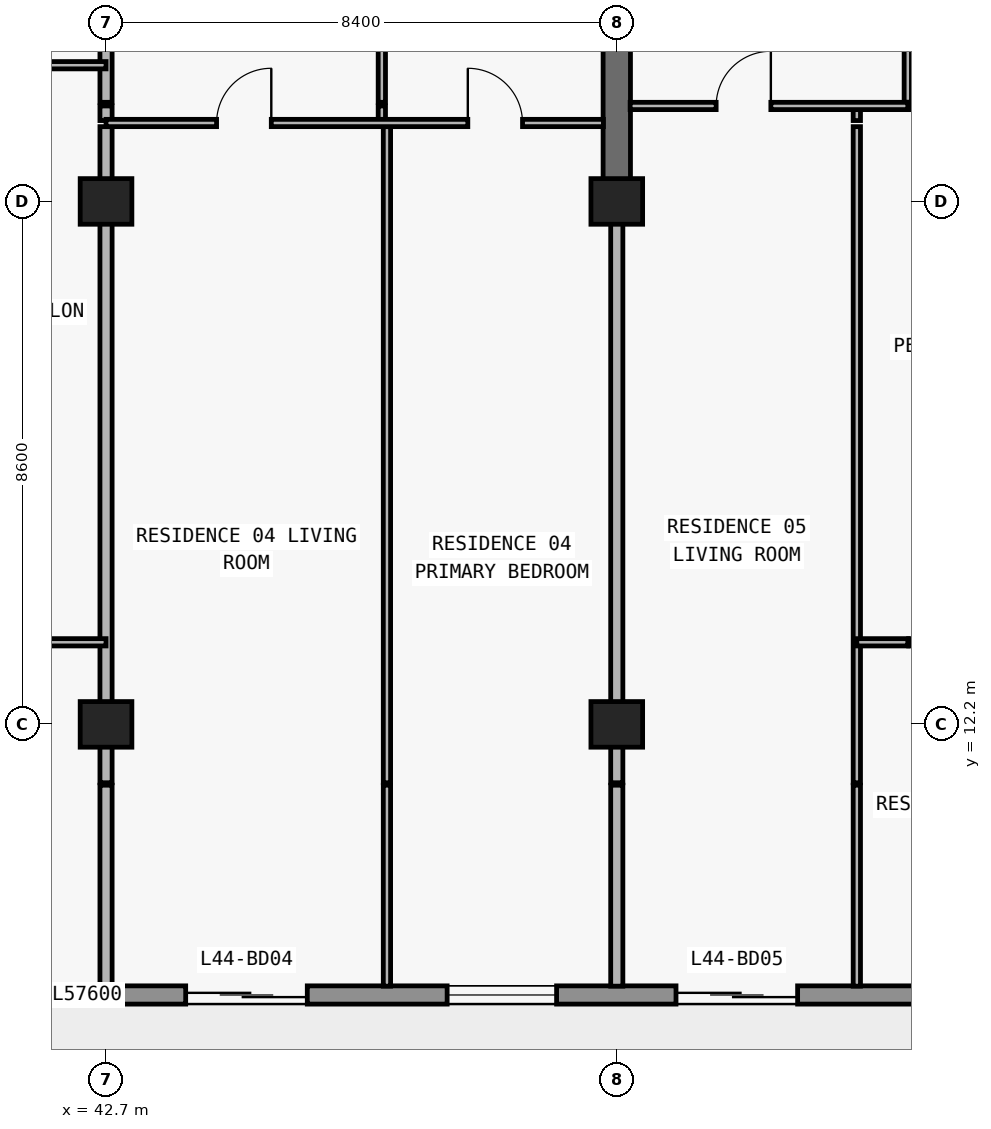
"""IFC4 building model, lengths in metres.
Left out: names, types, materials, properties, quantities, classifications, styles, units other than length and angle.
Written with IfcOpenShell. Run it as: python <this file> out.ifc"""

import sys

from ifc_helpers import new_model, si_unit, direction, frame, frame_2d, origin, origin_2d, place, context, subcontext, project, spatial, rectangle, extrude, element, fill, save


model = new_model("IFC4")
c1 = context("Model", 3, precision=1e-05, world=origin(), true_north=direction((0.0, 1.0)))
c2 = subcontext(c1, "Body", "Model", "MODEL_VIEW")
j1 = project(units=[si_unit("LENGTHUNIT", "METRE"), si_unit("PLANEANGLEUNIT", "RADIAN")], contexts=[c1])
p1 = place(None, origin())
s1 = spatial("IfcSite", under=j1, at=p1, CompositionType="ELEMENT")
p2 = place(p1, origin())
s2 = spatial("IfcBuilding", under=s1, at=p2, CompositionType="ELEMENT")
p3 = place(p2, frame((0.0, 0.0, 160.5)))
s3 = spatial("IfcBuildingStorey", under=s2, at=p3, CompositionType="ELEMENT", Elevation=160.5)
for number, where, z_axis, x_axis in (
    (1, (42.7, 12.2, 0.0), (0.0, 0.0, 1.0), (1.0, 0.0, 0.0)),
    (2, (51.1, 12.2, 0.0), (0.0, 0.0, 1.0), (1.0, 0.0, 0.0)),
    (3, (42.7, 20.8, 0.0), (0.0, 0.0, 1.0), (1.0, 0.0, 0.0)),
    (4, (51.1, 20.8, 0.0), (0.0, 0.0, 1.0), (1.0, 0.0, 0.0)),
):
    element("IfcColumn", number, at=place(p3, frame(where, z_axis=z_axis, x_axis=x_axis)), inside=s3, PredefinedType="COLUMN", context=c2, shape_type="SweptSolid", body=[
        extrude(rectangle(XDim=0.85, YDim=0.75, at=origin_2d()), origin(), (0.0, 0.0, 1.0), 3.05),
    ])
p4 = place(p3, frame((51.1, 20.8, 0.0), z_axis=(0.0, 0.0, 1.0), x_axis=(0.0, 1.0, 0.0)))
e5 = element("IfcWall", 5, at=p4, inside=s3, PredefinedType="SHEAR", context=c2, shape_type="SweptSolid", body=[
    extrude(rectangle(XDim=8.6, YDim=0.45, at=frame_2d((4.3, 0.0))), origin(), (0.0, 0.0, 1.0), 3.05),
])
p5 = place(p3, frame((67.7, 7.75, 0.0), z_axis=(0.0, 0.0, 1.0), x_axis=(-1.0, 0.0, 0.0)))
e6 = element("IfcWall", 6, at=p5, inside=s3, PredefinedType="STANDARD", context=c2, shape_type="SweptSolid", body=[
    extrude(rectangle(XDim=57.6, YDim=0.3, at=frame_2d((28.8, 0.0))), origin(), (0.0, 0.0, 1.0), 3.05),
])
p6 = place(p5, frame((54.673, 0.0, 0.0)))
e7 = element("IfcOpeningElement", 7, at=p6, cuts=e6, PredefinedType="OPENING", context=c2, shape_type="SweptSolid", body=[
    extrude(rectangle(XDim=2.0, YDim=2.3, at=frame_2d((1.0, 1.15))), frame((0.0, 0.16, 0.0), z_axis=(0.0, -1.0, 0.0), x_axis=(1.0, 0.0, 0.0)), (0.0, 0.0, 1.0), 0.32),
])
p7 = place(p5, frame((50.473, 0.0, 0.85)))
e8 = element("IfcOpeningElement", 8, at=p7, cuts=e6, PredefinedType="OPENING", context=c2, shape_type="SweptSolid", body=[
    extrude(rectangle(XDim=2.2, YDim=1.55, at=frame_2d((1.1, 0.775))), frame((0.0, 0.16, 0.0), z_axis=(0.0, -1.0, 0.0), x_axis=(1.0, 0.0, 0.0)), (0.0, 0.0, 1.0), 0.32),
])
p8 = place(p5, frame((46.09, 0.0, 0.0)))
e9 = element("IfcOpeningElement", 9, at=p8, cuts=e6, PredefinedType="OPENING", context=c2, shape_type="SweptSolid", body=[
    extrude(rectangle(XDim=2.0, YDim=2.3, at=frame_2d((1.0, 1.15))), frame((0.0, 0.16, 0.0), z_axis=(0.0, -1.0, 0.0), x_axis=(1.0, 0.0, 0.0)), (0.0, 0.0, 1.0), 0.32),
])
p9 = place(p5, frame((41.99, 0.0, 0.85)))
e10 = element("IfcOpeningElement", 10, at=p9, cuts=e6, PredefinedType="OPENING", context=c2, shape_type="SweptSolid", body=[
    extrude(rectangle(XDim=1.8, YDim=1.55, at=frame_2d((0.9, 0.775))), frame((0.0, 0.16, 0.0), z_axis=(0.0, -1.0, 0.0), x_axis=(1.0, 0.0, 0.0)), (0.0, 0.0, 1.0), 0.32),
])
p10 = place(p5, frame((38.09, 0.0, 0.0)))
e11 = element("IfcOpeningElement", 11, at=p10, cuts=e6, PredefinedType="OPENING", context=c2, shape_type="SweptSolid", body=[
    extrude(rectangle(XDim=2.0, YDim=2.3, at=frame_2d((1.0, 1.15))), frame((0.0, 0.16, 0.0), z_axis=(0.0, -1.0, 0.0), x_axis=(1.0, 0.0, 0.0)), (0.0, 0.0, 1.0), 0.32),
])
p11 = place(p5, frame((33.41, 0.0, 0.65)))
e12 = element("IfcOpeningElement", 12, at=p11, cuts=e6, PredefinedType="OPENING", context=c2, shape_type="SweptSolid", body=[
    extrude(rectangle(XDim=2.6, YDim=1.85, at=frame_2d((1.3, 0.925))), frame((0.0, 0.16, 0.0), z_axis=(0.0, -1.0, 0.0), x_axis=(1.0, 0.0, 0.0)), (0.0, 0.0, 1.0), 0.32),
])
p12 = place(p5, frame((27.7, 0.0, 0.85)))
e13 = element("IfcOpeningElement", 13, at=p12, cuts=e6, PredefinedType="OPENING", context=c2, shape_type="SweptSolid", body=[
    extrude(rectangle(XDim=2.2, YDim=1.55, at=frame_2d((1.1, 0.775))), frame((0.0, 0.16, 0.0), z_axis=(0.0, -1.0, 0.0), x_axis=(1.0, 0.0, 0.0)), (0.0, 0.0, 1.0), 0.32),
])
p13 = place(p5, frame((21.69, 0.0, 0.0)))
e14 = element("IfcOpeningElement", 14, at=p13, cuts=e6, PredefinedType="OPENING", context=c2, shape_type="SweptSolid", body=[
    extrude(rectangle(XDim=2.0, YDim=2.3, at=frame_2d((1.0, 1.15))), frame((0.0, 0.16, 0.0), z_axis=(0.0, -1.0, 0.0), x_axis=(1.0, 0.0, 0.0)), (0.0, 0.0, 1.0), 0.32),
])
p14 = place(p5, frame((17.59, 0.0, 0.85)))
e15 = element("IfcOpeningElement", 15, at=p14, cuts=e6, PredefinedType="OPENING", context=c2, shape_type="SweptSolid", body=[
    extrude(rectangle(XDim=1.8, YDim=1.55, at=frame_2d((0.9, 0.775))), frame((0.0, 0.16, 0.0), z_axis=(0.0, -1.0, 0.0), x_axis=(1.0, 0.0, 0.0)), (0.0, 0.0, 1.0), 0.32),
])
p15 = place(p5, frame((13.626, 0.0, 0.0)))
e16 = element("IfcOpeningElement", 16, at=p15, cuts=e6, PredefinedType="OPENING", context=c2, shape_type="SweptSolid", body=[
    extrude(rectangle(XDim=2.0, YDim=2.3, at=frame_2d((1.0, 1.15))), frame((0.0, 0.16, 0.0), z_axis=(0.0, -1.0, 0.0), x_axis=(1.0, 0.0, 0.0)), (0.0, 0.0, 1.0), 0.32),
])
p16 = place(p5, frame((9.326, 0.0, 0.85)))
e17 = element("IfcOpeningElement", 17, at=p16, cuts=e6, PredefinedType="OPENING", context=c2, shape_type="SweptSolid", body=[
    extrude(rectangle(XDim=2.2, YDim=1.55, at=frame_2d((1.1, 0.775))), frame((0.0, 0.16, 0.0), z_axis=(0.0, -1.0, 0.0), x_axis=(1.0, 0.0, 0.0)), (0.0, 0.0, 1.0), 0.32),
])
p17 = place(p5, frame((4.945, 0.0, 0.0)))
e18 = element("IfcOpeningElement", 18, at=p17, cuts=e6, PredefinedType="OPENING", context=c2, shape_type="SweptSolid", body=[
    extrude(rectangle(XDim=2.0, YDim=2.3, at=frame_2d((1.0, 1.15))), frame((0.0, 0.16, 0.0), z_axis=(0.0, -1.0, 0.0), x_axis=(1.0, 0.0, 0.0)), (0.0, 0.0, 1.0), 0.32),
])
p18 = place(p5, frame((0.945, 0.0, 0.85)))
e19 = element("IfcOpeningElement", 19, at=p18, cuts=e6, PredefinedType="OPENING", context=c2, shape_type="SweptSolid", body=[
    extrude(rectangle(XDim=1.8, YDim=1.55, at=frame_2d((0.9, 0.775))), frame((0.0, 0.16, 0.0), z_axis=(0.0, -1.0, 0.0), x_axis=(1.0, 0.0, 0.0)), (0.0, 0.0, 1.0), 0.32),
])
p19 = place(p3, frame((42.7, 7.895, 0.0), z_axis=(0.0, 0.0, 1.0), x_axis=(0.0, 1.0, 0.0)))
e20 = element("IfcWall", 20, at=p19, inside=s3, PredefinedType="PARTITIONING", context=c2, shape_type="SweptSolid", body=[
    extrude(rectangle(XDim=3.305, YDim=0.2, at=frame_2d((1.652, 0.0))), origin(), (0.0, 0.0, 1.0), 3.05),
])
p20 = place(p3, frame((42.7, 11.24, 0.0), z_axis=(0.0, 0.0, 1.0), x_axis=(0.0, 1.0, 0.0)))
e21 = element("IfcWall", 21, at=p20, inside=s3, PredefinedType="PARTITIONING", context=c2, shape_type="SweptSolid", body=[
    extrude(rectangle(XDim=10.79, YDim=0.2, at=frame_2d((5.395, 0.0))), origin(), (0.0, 0.0, 1.0), 2.263),
])
p21 = place(p3, frame((42.7, 22.13, 0.0), z_axis=(0.0, 0.0, 1.0), x_axis=(0.0, 1.0, 0.0)))
e22 = element("IfcWall", 22, at=p21, inside=s3, PredefinedType="PARTITIONING", context=c2, shape_type="SweptSolid", body=[
    extrude(rectangle(XDim=0.24, YDim=0.2, at=frame_2d((0.12, 0.0))), origin(), (0.0, 0.0, 1.0), 2.263),
])
p22 = place(p3, frame((42.7, 22.43, 0.0), z_axis=(0.0, 0.0, 1.0), x_axis=(0.0, 1.0, 0.0)))
e23 = element("IfcWall", 23, at=p22, inside=s3, PredefinedType="PARTITIONING", context=c2, shape_type="SweptSolid", body=[
    extrude(rectangle(XDim=4.75, YDim=0.2, at=frame_2d((2.375, 0.0))), origin(), (0.0, 0.0, 1.0), 2.263),
])
p23 = place(p3, frame((47.236, 22.13, 0.0), z_axis=(0.0, 0.0, 1.0), x_axis=(0.0, 1.0, 0.0)))
e24 = element("IfcWall", 24, at=p23, inside=s3, PredefinedType="PARTITIONING", context=c2, shape_type="SweptSolid", body=[
    extrude(rectangle(XDim=0.24, YDim=0.12, at=frame_2d((0.12, 0.0))), origin(), (0.0, 0.0, 1.0), 3.05),
])
p24 = place(p3, frame((47.236, 22.43, 0.0), z_axis=(0.0, 0.0, 1.0), x_axis=(0.0, 1.0, 0.0)))
e25 = element("IfcWall", 25, at=p24, inside=s3, PredefinedType="PARTITIONING", context=c2, shape_type="SweptSolid", body=[
    extrude(rectangle(XDim=4.75, YDim=0.12, at=frame_2d((2.375, 0.0))), origin(), (0.0, 0.0, 1.0), 3.05),
])
p25 = place(p24, frame((1.925, 0.0, 0.0)))
e26 = element("IfcOpeningElement", 26, at=p25, cuts=e25, PredefinedType="OPENING", context=c2, shape_type="SweptSolid", body=[
    extrude(rectangle(XDim=0.9, YDim=2.15, at=frame_2d((0.45, 1.075))), frame((0.0, 0.07, 0.0), z_axis=(0.0, -1.0, 0.0), x_axis=(1.0, 0.0, 0.0)), (0.0, 0.0, 1.0), 0.14),
])
p26 = place(p3, frame((47.32, 7.895, 0.0), z_axis=(0.0, 0.0, 1.0), x_axis=(0.0, 1.0, 0.0)))
e27 = element("IfcWall", 27, at=p26, inside=s3, PredefinedType="PARTITIONING", context=c2, shape_type="SweptSolid", body=[
    extrude(rectangle(XDim=3.305, YDim=0.12, at=frame_2d((1.652, 0.0))), origin(), (0.0, 0.0, 1.0), 3.05),
])
p27 = place(p3, frame((47.32, 11.24, 0.0), z_axis=(0.0, 0.0, 1.0), x_axis=(0.0, 1.0, 0.0)))
e28 = element("IfcWall", 28, at=p27, inside=s3, PredefinedType="PARTITIONING", context=c2, shape_type="SweptSolid", body=[
    extrude(rectangle(XDim=10.79, YDim=0.12, at=frame_2d((5.395, 0.0))), origin(), (0.0, 0.0, 1.0), 3.05),
])
p28 = place(p3, frame((51.1, 7.895, 0.0), z_axis=(0.0, 0.0, 1.0), x_axis=(0.0, 1.0, 0.0)))
e29 = element("IfcWall", 29, at=p28, inside=s3, PredefinedType="PARTITIONING", context=c2, shape_type="SweptSolid", body=[
    extrude(rectangle(XDim=3.305, YDim=0.2, at=frame_2d((1.652, 0.0))), origin(), (0.0, 0.0, 1.0), 3.05),
])
p29 = place(p3, frame((51.1, 11.24, 0.0), z_axis=(0.0, 0.0, 1.0), x_axis=(0.0, 1.0, 0.0)))
e30 = element("IfcWall", 30, at=p29, inside=s3, PredefinedType="PARTITIONING", context=c2, shape_type="SweptSolid", body=[
    extrude(rectangle(XDim=9.555, YDim=0.2, at=frame_2d((4.777, 0.0))), origin(), (0.0, 0.0, 1.0), 2.263),
])
p30 = place(p3, frame((55.048, 7.895, 0.0), z_axis=(0.0, 0.0, 1.0), x_axis=(0.0, 1.0, 0.0)))
e31 = element("IfcWall", 31, at=p30, inside=s3, PredefinedType="PARTITIONING", context=c2, shape_type="SweptSolid", body=[
    extrude(rectangle(XDim=3.305, YDim=0.12, at=frame_2d((1.652, 0.0))), origin(), (0.0, 0.0, 1.0), 3.05),
])
p31 = place(p3, frame((55.048, 11.24, 0.0), z_axis=(0.0, 0.0, 1.0), x_axis=(0.0, 1.0, 0.0)))
e32 = element("IfcWall", 32, at=p31, inside=s3, PredefinedType="PARTITIONING", context=c2, shape_type="SweptSolid", body=[
    extrude(rectangle(XDim=10.79, YDim=0.12, at=frame_2d((5.395, 0.0))), origin(), (0.0, 0.0, 1.0), 3.05),
])
p32 = place(p3, frame((55.048, 22.13, 0.0), z_axis=(0.0, 0.0, 1.0), x_axis=(0.0, 1.0, 0.0)))
e33 = element("IfcWall", 33, at=p32, inside=s3, PredefinedType="PARTITIONING", context=c2, shape_type="SweptSolid", body=[
    extrude(rectangle(XDim=0.24, YDim=0.12, at=frame_2d((0.12, 0.0))), origin(), (0.0, 0.0, 1.0), 3.05),
])
p33 = place(p3, frame((55.886, 22.43, 0.0), z_axis=(0.0, 0.0, 1.0), x_axis=(0.0, 1.0, 0.0)))
e34 = element("IfcWall", 34, at=p33, inside=s3, PredefinedType="PARTITIONING", context=c2, shape_type="SweptSolid", body=[
    extrude(rectangle(XDim=4.75, YDim=0.12, at=frame_2d((2.375, 0.0))), origin(), (0.0, 0.0, 1.0), 3.05),
])
p34 = place(p33, frame((1.925, 0.0, 0.0)))
e35 = element("IfcOpeningElement", 35, at=p34, cuts=e34, PredefinedType="OPENING", context=c2, shape_type="SweptSolid", body=[
    extrude(rectangle(XDim=0.9, YDim=2.15, at=frame_2d((0.45, 1.075))), frame((0.0, 0.07, 0.0), z_axis=(0.0, -1.0, 0.0), x_axis=(1.0, 0.0, 0.0)), (0.0, 0.0, 1.0), 0.14),
])
p35 = place(p3, frame((35.1, 13.55, 0.0), z_axis=(0.0, 0.0, 1.0), x_axis=(1.0, 0.0, 0.0)))
e36 = element("IfcWall", 36, at=p35, inside=s3, PredefinedType="PARTITIONING", context=c2, shape_type="SweptSolid", body=[
    extrude(rectangle(XDim=7.6, YDim=0.12, at=frame_2d((3.8, 0.0))), origin(), (0.0, 0.0, 1.0), 3.05),
])
p36 = place(p35, frame((3.35, 0.0, 0.0)))
e37 = element("IfcOpeningElement", 37, at=p36, cuts=e36, PredefinedType="OPENING", context=c2, shape_type="SweptSolid", body=[
    extrude(rectangle(XDim=0.9, YDim=2.15, at=frame_2d((0.45, 1.075))), frame((0.0, 0.07, 0.0), z_axis=(0.0, -1.0, 0.0), x_axis=(1.0, 0.0, 0.0)), (0.0, 0.0, 1.0), 0.14),
])
p37 = place(p3, frame((55.048, 13.55, 0.0), z_axis=(0.0, 0.0, 1.0), x_axis=(1.0, 0.0, 0.0)))
e38 = element("IfcWall", 38, at=p37, inside=s3, PredefinedType="PARTITIONING", context=c2, shape_type="SweptSolid", body=[
    extrude(rectangle(XDim=0.838, YDim=0.12, at=frame_2d((0.419, 0.0))), origin(), (0.0, 0.0, 1.0), 3.05),
])
p38 = place(p3, frame((55.9, 13.55, 0.0), z_axis=(0.0, 0.0, 1.0), x_axis=(1.0, 0.0, 0.0)))
e39 = element("IfcWall", 39, at=p38, inside=s3, PredefinedType="PARTITIONING", context=c2, shape_type="SweptSolid", body=[
    extrude(rectangle(XDim=3.6, YDim=0.12, at=frame_2d((1.8, 0.0))), origin(), (0.0, 0.0, 1.0), 3.05),
])
p39 = place(p38, frame((1.35, 0.0, 0.0)))
e40 = element("IfcOpeningElement", 40, at=p39, cuts=e39, PredefinedType="OPENING", context=c2, shape_type="SweptSolid", body=[
    extrude(rectangle(XDim=0.9, YDim=2.15, at=frame_2d((0.45, 1.075))), frame((0.0, 0.07, 0.0), z_axis=(0.0, -1.0, 0.0), x_axis=(1.0, 0.0, 0.0)), (0.0, 0.0, 1.0), 0.14),
])
p40 = place(p3, frame((42.7, 22.09, 0.0), z_axis=(0.0, 0.0, 1.0), x_axis=(1.0, 0.0, 0.0)))
e41 = element("IfcWall", 41, at=p40, inside=s3, PredefinedType="PARTITIONING", context=c2, shape_type="SweptSolid", body=[
    extrude(rectangle(XDim=8.18, YDim=0.12, at=frame_2d((4.09, 0.0))), origin(), (0.0, 0.0, 1.0), 3.05),
])
p41 = place(p40, frame((1.818, 0.0, 0.0)))
e42 = element("IfcOpeningElement", 42, at=p41, cuts=e41, PredefinedType="OPENING", context=c2, shape_type="SweptSolid", body=[
    extrude(rectangle(XDim=0.9, YDim=2.15, at=frame_2d((0.45, 1.075))), frame((0.0, 0.07, 0.0), z_axis=(0.0, -1.0, 0.0), x_axis=(1.0, 0.0, 0.0)), (0.0, 0.0, 1.0), 0.14),
])
p42 = place(p40, frame((5.95, 0.0, 0.0)))
e43 = element("IfcOpeningElement", 43, at=p42, cuts=e41, PredefinedType="OPENING", context=c2, shape_type="SweptSolid", body=[
    extrude(rectangle(XDim=0.9, YDim=2.15, at=frame_2d((0.45, 1.075))), frame((0.0, 0.07, 0.0), z_axis=(0.0, -1.0, 0.0), x_axis=(1.0, 0.0, 0.0)), (0.0, 0.0, 1.0), 0.14),
])
p43 = place(p3, frame((51.32, 22.37, 0.0), z_axis=(0.0, 0.0, 1.0), x_axis=(1.0, 0.0, 0.0)))
e44 = element("IfcWall", 44, at=p43, inside=s3, PredefinedType="PARTITIONING", context=c2, shape_type="SweptSolid", body=[
    extrude(rectangle(XDim=4.566, YDim=0.12, at=frame_2d((2.283, 0.0))), origin(), (0.0, 0.0, 1.0), 3.05),
])
p44 = place(p43, frame((1.414, 0.0, 0.0)))
e45 = element("IfcOpeningElement", 45, at=p44, cuts=e44, PredefinedType="OPENING", context=c2, shape_type="SweptSolid", body=[
    extrude(rectangle(XDim=0.9, YDim=2.15, at=frame_2d((0.45, 1.075))), frame((0.0, 0.07, 0.0), z_axis=(0.0, -1.0, 0.0), x_axis=(1.0, 0.0, 0.0)), (0.0, 0.0, 1.0), 0.14),
])
p45 = place(p3, frame((55.9, 22.37, 0.0), z_axis=(0.0, 0.0, 1.0), x_axis=(1.0, 0.0, 0.0)))
e46 = element("IfcWall", 46, at=p45, inside=s3, PredefinedType="PARTITIONING", context=c2, shape_type="SweptSolid", body=[
    extrude(rectangle(XDim=3.6, YDim=0.12, at=frame_2d((1.8, 0.0))), origin(), (0.0, 0.0, 1.0), 3.05),
])
p46 = place(p45, frame((1.35, 0.0, 0.0)))
e47 = element("IfcOpeningElement", 47, at=p46, cuts=e46, PredefinedType="OPENING", context=c2, shape_type="SweptSolid", body=[
    extrude(rectangle(XDim=0.9, YDim=2.15, at=frame_2d((0.45, 1.075))), frame((0.0, 0.07, 0.0), z_axis=(0.0, -1.0, 0.0), x_axis=(1.0, 0.0, 0.0)), (0.0, 0.0, 1.0), 0.14),
])
p47 = place(p3, frame((35.105, 23.04, 0.0), z_axis=(0.0, 0.0, 1.0), x_axis=(1.0, 0.0, 0.0)))
e48 = element("IfcWall", 48, at=p47, inside=s3, PredefinedType="PARTITIONING", context=c2, shape_type="SweptSolid", body=[
    extrude(rectangle(XDim=7.595, YDim=0.12, at=frame_2d((3.797, 0.0))), origin(), (0.0, 0.0, 1.0), 3.05),
])
p48 = place(p47, frame((3.347, 0.0, 0.0)))
e49 = element("IfcOpeningElement", 49, at=p48, cuts=e48, PredefinedType="OPENING", context=c2, shape_type="SweptSolid", body=[
    extrude(rectangle(XDim=0.9, YDim=2.15, at=frame_2d((0.45, 1.075))), frame((0.0, 0.07, 0.0), z_axis=(0.0, -1.0, 0.0), x_axis=(1.0, 0.0, 0.0)), (0.0, 0.0, 1.0), 0.14),
])
p49 = place(p13, origin())
e50 = element("IfcDoor", 50, at=p49, inside=s3, OperationType="DOUBLE_DOOR_SLIDING", PredefinedType="DOOR", context=c2, shape_type="SweptSolid", body=[
    extrude(rectangle(XDim=2.0, YDim=2.3, at=frame_2d((1.0, 1.15))), frame((0.0, 0.025, 0.0), z_axis=(0.0, -1.0, 0.0), x_axis=(1.0, 0.0, 0.0)), (0.0, 0.0, 1.0), 0.05),
])
fill(e14, e50)
p50 = place(p14, origin())
e51 = element("IfcWindow", 51, at=p50, inside=s3, PartitioningType="SINGLE_PANEL", PredefinedType="WINDOW", context=c2, shape_type="SweptSolid", body=[
    extrude(rectangle(XDim=1.8, YDim=1.55, at=frame_2d((0.9, 0.775))), frame((0.0, 0.03, 0.0), z_axis=(0.0, -1.0, 0.0), x_axis=(1.0, 0.0, 0.0)), (0.0, 0.0, 1.0), 0.06),
])
fill(e15, e51)
p51 = place(p15, origin())
e52 = element("IfcDoor", 52, at=p51, inside=s3, OperationType="DOUBLE_DOOR_SLIDING", PredefinedType="DOOR", context=c2, shape_type="SweptSolid", body=[
    extrude(rectangle(XDim=2.0, YDim=2.3, at=frame_2d((1.0, 1.15))), frame((0.0, 0.025, 0.0), z_axis=(0.0, -1.0, 0.0), x_axis=(1.0, 0.0, 0.0)), (0.0, 0.0, 1.0), 0.05),
])
fill(e16, e52)
p52 = place(p41, origin())
e53 = element("IfcDoor", 53, at=p52, inside=s3, OperationType="SINGLE_SWING_RIGHT", PredefinedType="DOOR", context=c2, shape_type="SweptSolid", body=[
    extrude(rectangle(XDim=0.9, YDim=2.15, at=frame_2d((0.45, 1.075))), frame((0.0, 0.025, 0.0), z_axis=(0.0, -1.0, 0.0), x_axis=(1.0, 0.0, 0.0)), (0.0, 0.0, 1.0), 0.05),
])
fill(e42, e53)
p53 = place(p42, origin())
e54 = element("IfcDoor", 54, at=p53, inside=s3, OperationType="SINGLE_SWING_LEFT", PredefinedType="DOOR", context=c2, shape_type="SweptSolid", body=[
    extrude(rectangle(XDim=0.9, YDim=2.15, at=frame_2d((0.45, 1.075))), frame((0.0, 0.025, 0.0), z_axis=(0.0, -1.0, 0.0), x_axis=(1.0, 0.0, 0.0)), (0.0, 0.0, 1.0), 0.05),
])
fill(e43, e54)
p54 = place(p44, origin())
e55 = element("IfcDoor", 55, at=p54, inside=s3, OperationType="SINGLE_SWING_RIGHT", PredefinedType="DOOR", context=c2, shape_type="SweptSolid", body=[
    extrude(rectangle(XDim=0.9, YDim=2.15, at=frame_2d((0.45, 1.075))), frame((0.0, 0.025, 0.0), z_axis=(0.0, -1.0, 0.0), x_axis=(1.0, 0.0, 0.0)), (0.0, 0.0, 1.0), 0.05),
])
fill(e45, e55)
save(model, sys.argv[1])
